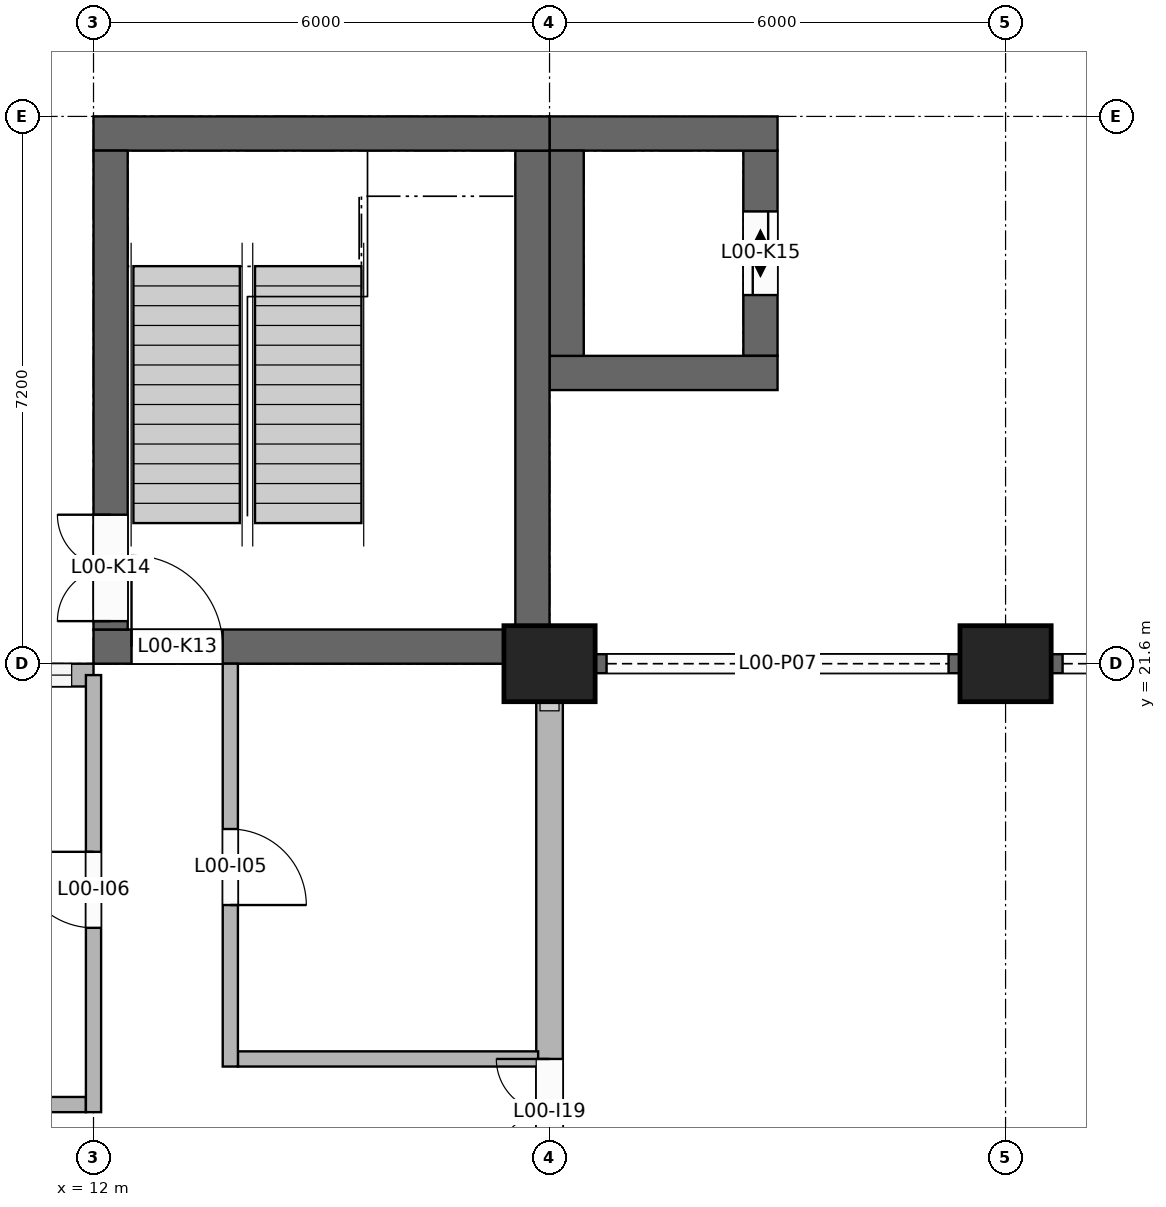
"""IFC4 building model, lengths in metres.
Left out: names, types, materials, properties, quantities, classifications, styles, units other than length and angle.
Written with IfcOpenShell. Run it as: python <this file> out.ifc"""

import sys

from ifc_helpers import new_model, si_unit, direction, frame, frame_2d, origin, origin_2d, place, context, subcontext, project, spatial, rectangle, extrude, element, fill, save


model = new_model("IFC4")
c1 = context("Model", 3, precision=1e-05, world=origin(), true_north=direction((0.0, 1.0)))
c2 = subcontext(c1, "Body", "Model", "MODEL_VIEW")
j1 = project(units=[si_unit("LENGTHUNIT", "METRE"), si_unit("PLANEANGLEUNIT", "RADIAN")], contexts=[c1])
p1 = place(None, origin())
s1 = spatial("IfcSite", under=j1, at=p1, CompositionType="ELEMENT")
p2 = place(p1, origin())
s2 = spatial("IfcBuilding", under=s1, at=p2, CompositionType="ELEMENT")
p3 = place(p2, origin())
s3 = spatial("IfcBuildingStorey", under=s2, at=p3, CompositionType="ELEMENT", Elevation=0.0)
p4 = place(p3, frame((12.0, 21.825, 0.0), z_axis=(0.0, 0.0, 1.0), x_axis=(1.0, 0.0, 0.0)))
e1 = element("IfcWall", 1, at=p4, inside=s3, PredefinedType="SHEAR", context=c2, shape_type="SweptSolid", body=[
    extrude(rectangle(XDim=5.4, YDim=0.45, at=frame_2d((2.7, 0.0))), origin(), (0.0, 0.0, 1.0), 4.0),
])
p5 = place(p4, frame((0.5, 0.0, 0.0)))
e2 = element("IfcOpeningElement", 2, at=p5, cuts=e1, PredefinedType="OPENING", context=c2, shape_type="SweptSolid", body=[
    extrude(rectangle(XDim=1.2, YDim=2.1, at=frame_2d((0.6, 1.05))), frame((0.0, 0.235, 0.0), z_axis=(0.0, -1.0, 0.0), x_axis=(1.0, 0.0, 0.0)), (0.0, 0.0, 1.0), 0.47),
])
p6 = place(p3, frame((12.0, 28.575, 0.0), z_axis=(0.0, 0.0, 1.0), x_axis=(1.0, 0.0, 0.0)))
e3 = element("IfcWall", 3, at=p6, inside=s3, PredefinedType="SHEAR", context=c2, shape_type="SweptSolid", body=[
    extrude(rectangle(XDim=6.0, YDim=0.45, at=frame_2d((3.0, 0.0))), origin(), (0.0, 0.0, 1.0), 4.0),
])
p7 = place(p3, frame((12.225, 22.05, 0.0), z_axis=(0.0, 0.0, 1.0), x_axis=(0.0, 1.0, 0.0)))
e4 = element("IfcWall", 4, at=p7, inside=s3, PredefinedType="SHEAR", context=c2, shape_type="SweptSolid", body=[
    extrude(rectangle(XDim=6.3, YDim=0.45, at=frame_2d((3.15, 0.0))), origin(), (0.0, 0.0, 1.0), 4.0),
])
p8 = place(p7, frame((0.11, 0.0, 0.0)))
e5 = element("IfcOpeningElement", 5, at=p8, cuts=e4, PredefinedType="OPENING", context=c2, shape_type="SweptSolid", body=[
    extrude(rectangle(XDim=1.4, YDim=2.1, at=frame_2d((0.7, 1.05))), frame((0.0, 0.235, 0.0), z_axis=(0.0, -1.0, 0.0), x_axis=(1.0, 0.0, 0.0)), (0.0, 0.0, 1.0), 0.47),
])
p9 = place(p3, frame((17.775, 22.1, 0.0), z_axis=(0.0, 0.0, 1.0), x_axis=(0.0, 1.0, 0.0)))
e6 = element("IfcWall", 6, at=p9, inside=s3, PredefinedType="SHEAR", context=c2, shape_type="SweptSolid", body=[
    extrude(rectangle(XDim=6.25, YDim=0.45, at=frame_2d((3.125, 0.0))), origin(), (0.0, 0.0, 1.0), 4.0),
])
for number, where, z_axis, x_axis in (
    (7, (18.0, 25.425, 0.0), (0.0, 0.0, 1.0), (1.0, 0.0, 0.0)),
    (8, (18.0, 28.575, 0.0), (0.0, 0.0, 1.0), (1.0, 0.0, 0.0)),
):
    element("IfcWall", number, at=place(p3, frame(where, z_axis=z_axis, x_axis=x_axis)), inside=s3, PredefinedType="SHEAR", context=c2, shape_type="SweptSolid", body=[
        extrude(rectangle(XDim=3.0, YDim=0.45, at=frame_2d((1.5, 0.0))), origin(), (0.0, 0.0, 1.0), 4.2),
    ])
p10 = place(p3, frame((20.775, 25.65, 0.0), z_axis=(0.0, 0.0, 1.0), x_axis=(0.0, 1.0, 0.0)))
e9 = element("IfcWall", 9, at=p10, inside=s3, PredefinedType="SHEAR", context=c2, shape_type="SweptSolid", body=[
    extrude(rectangle(XDim=2.7, YDim=0.45, at=frame_2d((1.35, 0.0))), origin(), (0.0, 0.0, 1.0), 4.2),
])
p11 = place(p10, frame((0.8, 0.0, 0.0)))
e10 = element("IfcOpeningElement", 10, at=p11, cuts=e9, PredefinedType="OPENING", context=c2, shape_type="SweptSolid", body=[
    extrude(rectangle(XDim=1.1, YDim=2.1, at=frame_2d((0.55, 1.05))), frame((0.0, 0.235, 0.0), z_axis=(0.0, -1.0, 0.0), x_axis=(1.0, 0.0, 0.0)), (0.0, 0.0, 1.0), 0.47),
])
for number, where, z_axis, x_axis in (
    (11, (18.0, 25.425, -1.7), (0.0, 0.0, 1.0), (1.0, 0.0, 0.0)),
    (12, (18.0, 28.575, -1.7), (0.0, 0.0, 1.0), (1.0, 0.0, 0.0)),
):
    element("IfcWall", number, at=place(p3, frame(where, z_axis=z_axis, x_axis=x_axis)), inside=s3, PredefinedType="SHEAR", context=c2, shape_type="SweptSolid", body=[
        extrude(rectangle(XDim=3.0, YDim=0.45, at=frame_2d((1.5, 0.0))), origin(), (0.0, 0.0, 1.0), 1.7),
    ])
for number, where, z_axis, x_axis in (
    (13, (18.225, 25.65, -1.7), (0.0, 0.0, 1.0), (0.0, 1.0, 0.0)),
    (14, (20.775, 25.65, -1.7), (0.0, 0.0, 1.0), (0.0, 1.0, 0.0)),
):
    element("IfcWall", number, at=place(p3, frame(where, z_axis=z_axis, x_axis=x_axis)), inside=s3, PredefinedType="SHEAR", context=c2, shape_type="SweptSolid", body=[
        extrude(rectangle(XDim=2.7, YDim=0.45, at=frame_2d((1.35, 0.0))), origin(), (0.0, 0.0, 1.0), 1.7),
    ])
for number, where, z_axis, x_axis in (
    (15, (18.0, 21.6, -0.25), (0.0, 0.0, 1.0), (1.0, 0.0, 0.0)),
    (16, (24.0, 21.6, -0.25), (0.0, 0.0, 1.0), (1.0, 0.0, 0.0)),
):
    element("IfcColumn", number, at=place(p3, frame(where, z_axis=z_axis, x_axis=x_axis)), inside=s3, PredefinedType="COLUMN", context=c2, shape_type="SweptSolid", body=[
        extrude(rectangle(XDim=1.2, YDim=1.0, at=origin_2d()), origin(), (0.0, 0.0, 1.0), 4.45),
    ])
p12 = place(p3, frame((18.0, 14.9, 0.0), z_axis=(0.0, 0.0, 1.0), x_axis=(0.0, 1.0, 0.0)))
e17 = element("IfcWall", 17, at=p12, inside=s3, PredefinedType="SOLIDWALL", context=c2, shape_type="SweptSolid", body=[
    extrude(rectangle(XDim=6.2, YDim=0.35, at=frame_2d((3.1, 0.0))), origin(), (0.0, 0.0, 1.0), 4.2),
])
p13 = place(p12, frame((0.1, 0.0, 0.0)))
e18 = element("IfcOpeningElement", 18, at=p13, cuts=e17, PredefinedType="OPENING", context=c2, shape_type="SweptSolid", body=[
    extrude(rectangle(XDim=1.4, YDim=2.1, at=frame_2d((0.7, 1.05))), frame((0.0, 0.185, 0.0), z_axis=(0.0, -1.0, 0.0), x_axis=(1.0, 0.0, 0.0)), (0.0, 0.0, 1.0), 0.37),
])
p14 = place(p3, frame((18.6, 21.6, 0.0), z_axis=(0.0, 0.0, 1.0), x_axis=(1.0, 0.0, 0.0)))
e19 = element("IfcWall", 19, at=p14, inside=s3, PredefinedType="SOLIDWALL", context=c2, shape_type="SweptSolid", body=[
    extrude(rectangle(XDim=4.8, YDim=0.25, at=frame_2d((2.4, 0.0))), origin(), (0.0, 0.0, 1.0), 5.4),
])
p15 = place(p14, frame((0.15, 0.0, 0.0)))
e20 = element("IfcOpeningElement", 20, at=p15, cuts=e19, PredefinedType="OPENING", context=c2, shape_type="SweptSolid", body=[
    extrude(rectangle(XDim=4.5, YDim=4.8, at=frame_2d((2.25, 2.4))), frame((0.0, 0.135, 0.0), z_axis=(0.0, -1.0, 0.0), x_axis=(1.0, 0.0, 0.0)), (0.0, 0.0, 1.0), 0.27),
])
p16 = place(p3, frame((24.6, 21.6, 0.0), z_axis=(0.0, 0.0, 1.0), x_axis=(1.0, 0.0, 0.0)))
e21 = element("IfcWall", 21, at=p16, inside=s3, PredefinedType="SOLIDWALL", context=c2, shape_type="SweptSolid", body=[
    extrude(rectangle(XDim=4.8, YDim=0.25, at=frame_2d((2.4, 0.0))), origin(), (0.0, 0.0, 1.0), 5.4),
])
p17 = place(p16, frame((0.15, 0.0, 0.0)))
e22 = element("IfcOpeningElement", 22, at=p17, cuts=e21, PredefinedType="OPENING", context=c2, shape_type="SweptSolid", body=[
    extrude(rectangle(XDim=4.5, YDim=4.8, at=frame_2d((2.25, 2.4))), frame((0.0, 0.135, 0.0), z_axis=(0.0, -1.0, 0.0), x_axis=(1.0, 0.0, 0.0)), (0.0, 0.0, 1.0), 0.27),
])
p18 = place(p3, frame((6.0, 21.45, 0.0), z_axis=(0.0, 0.0, 1.0), x_axis=(1.0, 0.0, 0.0)))
e23 = element("IfcWall", 23, at=p18, inside=s3, PredefinedType="SOLIDWALL", context=c2, shape_type="SweptSolid", body=[
    extrude(rectangle(XDim=6.0, YDim=0.3, at=frame_2d((3.0, 0.0))), origin(), (0.0, 0.0, 1.0), 3.1),
])
p19 = place(p18, frame((0.188, 0.0, 0.9)))
e24 = element("IfcOpeningElement", 24, at=p19, cuts=e23, PredefinedType="OPENING", context=c2, shape_type="SweptSolid", body=[
    extrude(rectangle(XDim=1.1, YDim=1.5, at=frame_2d((0.55, 0.75))), frame((0.0, 0.16, 0.0), z_axis=(0.0, -1.0, 0.0), x_axis=(1.0, 0.0, 0.0)), (0.0, 0.0, 1.0), 0.32),
])
p20 = place(p18, frame((1.663, 0.0, 0.9)))
e25 = element("IfcOpeningElement", 25, at=p20, cuts=e23, PredefinedType="OPENING", context=c2, shape_type="SweptSolid", body=[
    extrude(rectangle(XDim=1.1, YDim=1.5, at=frame_2d((0.55, 0.75))), frame((0.0, 0.16, 0.0), z_axis=(0.0, -1.0, 0.0), x_axis=(1.0, 0.0, 0.0)), (0.0, 0.0, 1.0), 0.32),
])
p21 = place(p18, frame((3.137, 0.0, 0.9)))
e26 = element("IfcOpeningElement", 26, at=p21, cuts=e23, PredefinedType="OPENING", context=c2, shape_type="SweptSolid", body=[
    extrude(rectangle(XDim=1.1, YDim=1.5, at=frame_2d((0.55, 0.75))), frame((0.0, 0.16, 0.0), z_axis=(0.0, -1.0, 0.0), x_axis=(1.0, 0.0, 0.0)), (0.0, 0.0, 1.0), 0.32),
])
p22 = place(p18, frame((4.613, 0.0, 0.9)))
e27 = element("IfcOpeningElement", 27, at=p22, cuts=e23, PredefinedType="OPENING", context=c2, shape_type="SweptSolid", body=[
    extrude(rectangle(XDim=1.1, YDim=1.5, at=frame_2d((0.55, 0.75))), frame((0.0, 0.16, 0.0), z_axis=(0.0, -1.0, 0.0), x_axis=(1.0, 0.0, 0.0)), (0.0, 0.0, 1.0), 0.32),
])
p23 = place(p3, frame((12.0, 15.7, 0.0), z_axis=(0.0, 0.0, 1.0), x_axis=(0.0, 1.0, 0.0)))
e28 = element("IfcWall", 28, at=p23, inside=s3, PredefinedType="PARTITIONING", context=c2, shape_type="SweptSolid", body=[
    extrude(rectangle(XDim=5.75, YDim=0.2, at=frame_2d((2.875, 0.0))), origin(), (0.0, 0.0, 1.0), 3.1),
])
p24 = place(p23, frame((2.425, 0.0, 0.0)))
e29 = element("IfcOpeningElement", 29, at=p24, cuts=e28, PredefinedType="OPENING", context=c2, shape_type="SweptSolid", body=[
    extrude(rectangle(XDim=1.0, YDim=2.1, at=frame_2d((0.5, 1.05))), frame((0.0, 0.11, 0.0), z_axis=(0.0, -1.0, 0.0), x_axis=(1.0, 0.0, 0.0)), (0.0, 0.0, 1.0), 0.22),
])
p25 = place(p3, frame((13.8, 16.3, 0.0), z_axis=(0.0, 0.0, 1.0), x_axis=(0.0, 1.0, 0.0)))
e30 = element("IfcWall", 30, at=p25, inside=s3, PredefinedType="PARTITIONING", context=c2, shape_type="SweptSolid", body=[
    extrude(rectangle(XDim=5.3, YDim=0.2, at=frame_2d((2.65, 0.0))), origin(), (0.0, 0.0, 1.0), 4.0),
])
p26 = place(p25, frame((2.125, 0.0, 0.0)))
e31 = element("IfcOpeningElement", 31, at=p26, cuts=e30, PredefinedType="OPENING", context=c2, shape_type="SweptSolid", body=[
    extrude(rectangle(XDim=1.0, YDim=2.1, at=frame_2d((0.5, 1.05))), frame((0.0, 0.11, 0.0), z_axis=(0.0, -1.0, 0.0), x_axis=(1.0, 0.0, 0.0)), (0.0, 0.0, 1.0), 0.22),
])
p27 = place(p3, frame((11.4, 15.8, 0.0), z_axis=(0.0, 0.0, 1.0), x_axis=(1.0, 0.0, 0.0)))
e32 = element("IfcWall", 32, at=p27, inside=s3, PredefinedType="PARTITIONING", context=c2, shape_type="SweptSolid", body=[
    extrude(rectangle(XDim=0.5, YDim=0.2, at=frame_2d((0.25, 0.0))), origin(), (0.0, 0.0, 1.0), 3.1),
])
p28 = place(p3, frame((13.9, 16.4, 0.0), z_axis=(0.0, 0.0, 1.0), x_axis=(1.0, 0.0, 0.0)))
e33 = element("IfcWall", 33, at=p28, inside=s3, PredefinedType="PARTITIONING", context=c2, shape_type="SweptSolid", body=[
    extrude(rectangle(XDim=3.95, YDim=0.2, at=frame_2d((1.975, 0.0))), origin(), (0.0, 0.0, 1.0), 4.0),
])
p29 = place(p15, origin())
e34 = element("IfcDoor", 34, at=p29, inside=s3, OperationType="ROLLINGUP", PredefinedType="DOOR", context=c2, shape_type="SweptSolid", body=[
    extrude(rectangle(XDim=4.5, YDim=4.8, at=frame_2d((2.25, 2.4))), frame((0.0, 0.025, 0.0), z_axis=(0.0, -1.0, 0.0), x_axis=(1.0, 0.0, 0.0)), (0.0, 0.0, 1.0), 0.05),
])
fill(e20, e34)
p30 = place(p17, origin())
e35 = element("IfcDoor", 35, at=p30, inside=s3, OperationType="ROLLINGUP", PredefinedType="DOOR", context=c2, shape_type="SweptSolid", body=[
    extrude(rectangle(XDim=4.5, YDim=4.8, at=frame_2d((2.25, 2.4))), frame((0.0, 0.025, 0.0), z_axis=(0.0, -1.0, 0.0), x_axis=(1.0, 0.0, 0.0)), (0.0, 0.0, 1.0), 0.05),
])
fill(e22, e35)
p31 = place(p22, origin())
e36 = element("IfcWindow", 36, at=p31, inside=s3, PartitioningType="SINGLE_PANEL", PredefinedType="WINDOW", context=c2, shape_type="SweptSolid", body=[
    extrude(rectangle(XDim=1.1, YDim=1.5, at=frame_2d((0.55, 0.75))), frame((0.0, 0.03, 0.0), z_axis=(0.0, -1.0, 0.0), x_axis=(1.0, 0.0, 0.0)), (0.0, 0.0, 1.0), 0.06),
])
fill(e27, e36)
p32 = place(p5, origin())
e37 = element("IfcDoor", 37, at=p32, inside=s3, OperationType="SINGLE_SWING_LEFT", PredefinedType="DOOR", context=c2, shape_type="SweptSolid", body=[
    extrude(rectangle(XDim=1.2, YDim=2.1, at=frame_2d((0.6, 1.05))), frame((0.0, 0.025, 0.0), z_axis=(0.0, -1.0, 0.0), x_axis=(1.0, 0.0, 0.0)), (0.0, 0.0, 1.0), 0.05),
])
fill(e2, e37)
p33 = place(p8, origin())
e38 = element("IfcDoor", 38, at=p33, inside=s3, OperationType="DOUBLE_DOOR_SINGLE_SWING", PredefinedType="DOOR", context=c2, shape_type="SweptSolid", body=[
    extrude(rectangle(XDim=1.4, YDim=2.1, at=frame_2d((0.7, 1.05))), frame((0.0, 0.025, 0.0), z_axis=(0.0, -1.0, 0.0), x_axis=(1.0, 0.0, 0.0)), (0.0, 0.0, 1.0), 0.05),
])
fill(e5, e38)
p34 = place(p11, origin())
e39 = element("IfcDoor", 39, at=p34, inside=s3, OperationType="DOUBLE_DOOR_SLIDING", PredefinedType="DOOR", context=c2, shape_type="SweptSolid", body=[
    extrude(rectangle(XDim=1.1, YDim=2.1, at=frame_2d((0.55, 1.05))), frame((0.0, 0.025, 0.0), z_axis=(0.0, -1.0, 0.0), x_axis=(1.0, 0.0, 0.0)), (0.0, 0.0, 1.0), 0.05),
])
fill(e10, e39)
p35 = place(p26, frame((1.0, 0.0, 0.0), z_axis=(0.0, 0.0, 1.0), x_axis=(-1.0, 0.0, 0.0)))
e40 = element("IfcDoor", 40, at=p35, inside=s3, OperationType="SINGLE_SWING_RIGHT", PredefinedType="DOOR", context=c2, shape_type="SweptSolid", body=[
    extrude(rectangle(XDim=1.0, YDim=2.1, at=frame_2d((0.5, 1.05))), frame((0.0, 0.025, 0.0), z_axis=(0.0, -1.0, 0.0), x_axis=(1.0, 0.0, 0.0)), (0.0, 0.0, 1.0), 0.05),
])
fill(e31, e40)
p36 = place(p24, origin())
e41 = element("IfcDoor", 41, at=p36, inside=s3, OperationType="SINGLE_SWING_RIGHT", PredefinedType="DOOR", context=c2, shape_type="SweptSolid", body=[
    extrude(rectangle(XDim=1.0, YDim=2.1, at=frame_2d((0.5, 1.05))), frame((0.0, 0.025, 0.0), z_axis=(0.0, -1.0, 0.0), x_axis=(1.0, 0.0, 0.0)), (0.0, 0.0, 1.0), 0.05),
])
fill(e29, e41)
p37 = place(p13, origin())
e42 = element("IfcDoor", 42, at=p37, inside=s3, OperationType="DOUBLE_DOOR_DOUBLE_SWING", PredefinedType="DOOR", context=c2, shape_type="SweptSolid", body=[
    extrude(rectangle(XDim=1.4, YDim=2.1, at=frame_2d((0.7, 1.05))), frame((0.0, 0.025, 0.0), z_axis=(0.0, -1.0, 0.0), x_axis=(1.0, 0.0, 0.0)), (0.0, 0.0, 1.0), 0.05),
])
fill(e18, e42)
save(model, sys.argv[1])
